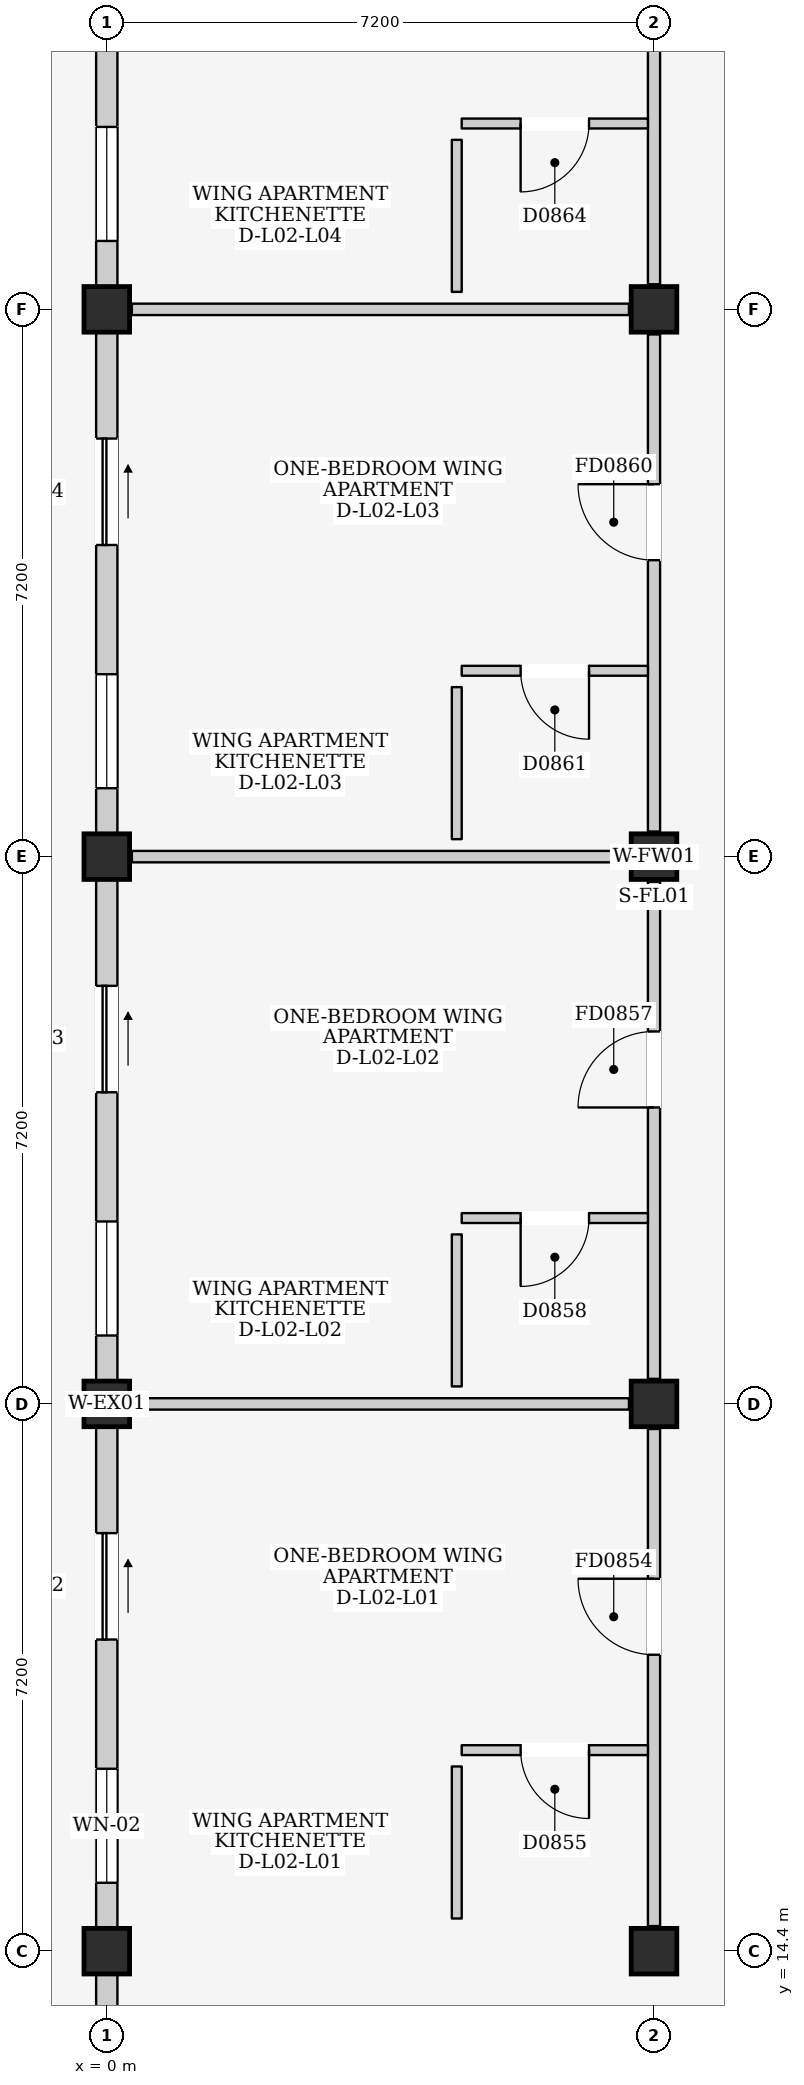
"""IFC4 building model, lengths in metres.
Left out: names, types, materials, properties, quantities, classifications, styles, units other than length and angle.
Written with IfcOpenShell. Run it as: python <this file> out.ifc"""

import sys

from ifc_helpers import new_model, si_unit, direction, frame, frame_2d, origin, origin_2d, place, context, subcontext, project, spatial, rectangle, extrude, element, fill, save


model = new_model("IFC4")
c1 = context("Model", 3, precision=1e-05, world=origin(), true_north=direction((0.0, 1.0)))
c2 = subcontext(c1, "Body", "Model", "MODEL_VIEW")
j1 = project(units=[si_unit("LENGTHUNIT", "METRE"), si_unit("PLANEANGLEUNIT", "RADIAN")], contexts=[c1])
p1 = place(None, origin())
s1 = spatial("IfcSite", under=j1, at=p1, CompositionType="ELEMENT")
p2 = place(p1, origin())
s2 = spatial("IfcBuilding", under=s1, at=p2, CompositionType="ELEMENT")
p3 = place(p2, frame((0.0, 0.0, 9.0)))
s3 = spatial("IfcBuildingStorey", under=s2, at=p3, CompositionType="ELEMENT", Elevation=9.0)
for number, where, z_axis, x_axis in (
    (1, (0.0, 14.4, 0.0), (0.0, 0.0, 1.0), (1.0, 0.0, 0.0)),
    (2, (0.0, 21.6, 0.0), (0.0, 0.0, 1.0), (1.0, 0.0, 0.0)),
    (3, (0.0, 28.8, 0.0), (0.0, 0.0, 1.0), (1.0, 0.0, 0.0)),
    (4, (0.0, 36.0, 0.0), (0.0, 0.0, 1.0), (1.0, 0.0, 0.0)),
    (5, (7.2, 14.4, 0.0), (0.0, 0.0, 1.0), (1.0, 0.0, 0.0)),
    (6, (7.2, 21.6, 0.0), (0.0, 0.0, 1.0), (1.0, 0.0, 0.0)),
    (7, (7.2, 28.8, 0.0), (0.0, 0.0, 1.0), (1.0, 0.0, 0.0)),
    (8, (7.2, 36.0, 0.0), (0.0, 0.0, 1.0), (1.0, 0.0, 0.0)),
):
    element("IfcColumn", number, at=place(p3, frame(where, z_axis=z_axis, x_axis=x_axis)), inside=s3, PredefinedType="COLUMN", context=c2, shape_type="SweptSolid", body=[
        extrude(rectangle(XDim=0.6, YDim=0.6, at=origin_2d()), origin(), (0.0, 0.0, 1.0), 3.2),
    ])
p4 = place(p3, frame((0.0, 7.5, 0.0), z_axis=(0.0, 0.0, 1.0), x_axis=(0.0, 1.0, 0.0)))
e9 = element("IfcWall", 9, at=p4, inside=s3, PredefinedType="ELEMENTEDWALL", context=c2, shape_type="SweptSolid", body=[
    extrude(rectangle(XDim=6.6, YDim=0.28, at=frame_2d((3.3, 0.0))), origin(), (0.0, 0.0, 1.0), 2.425),
])
p5 = place(p4, frame((3.65, 0.0, 0.0)))
e10 = element("IfcOpeningElement", 10, at=p5, cuts=e9, PredefinedType="OPENING", context=c2, shape_type="SweptSolid", body=[
    extrude(rectangle(XDim=1.4, YDim=2.1, at=frame_2d((0.7, 1.05))), frame((0.0, 0.155, 0.0), z_axis=(0.0, -1.0, 0.0), x_axis=(1.0, 0.0, 0.0)), (0.0, 0.0, 1.0), 0.31),
])
p6 = place(p3, frame((0.0, 14.7, 0.0), z_axis=(0.0, 0.0, 1.0), x_axis=(0.0, 1.0, 0.0)))
e11 = element("IfcWall", 11, at=p6, inside=s3, PredefinedType="ELEMENTEDWALL", context=c2, shape_type="SweptSolid", body=[
    extrude(rectangle(XDim=6.6, YDim=0.28, at=frame_2d((3.3, 0.0))), origin(), (0.0, 0.0, 1.0), 2.425),
])
p7 = place(p6, frame((3.8, 0.0, 0.0)))
e12 = element("IfcOpeningElement", 12, at=p7, cuts=e11, PredefinedType="OPENING", context=c2, shape_type="SweptSolid", body=[
    extrude(rectangle(XDim=1.4, YDim=2.1, at=frame_2d((0.7, 1.05))), frame((0.0, 0.155, 0.0), z_axis=(0.0, -1.0, 0.0), x_axis=(1.0, 0.0, 0.0)), (0.0, 0.0, 1.0), 0.31),
])
p8 = place(p6, frame((0.6, 0.0, 0.815)))
e13 = element("IfcOpeningElement", 13, at=p8, cuts=e11, PredefinedType="OPENING", context=c2, shape_type="SweptSolid", body=[
    extrude(rectangle(XDim=1.5, YDim=1.5, at=frame_2d((0.75, 0.75))), frame((0.0, 0.155, 0.0), z_axis=(0.0, -1.0, 0.0), x_axis=(1.0, 0.0, 0.0)), (0.0, 0.0, 1.0), 0.31),
])
p9 = place(p3, frame((0.0, 21.9, 0.0), z_axis=(0.0, 0.0, 1.0), x_axis=(0.0, 1.0, 0.0)))
e14 = element("IfcWall", 14, at=p9, inside=s3, PredefinedType="ELEMENTEDWALL", context=c2, shape_type="SweptSolid", body=[
    extrude(rectangle(XDim=6.6, YDim=0.28, at=frame_2d((3.3, 0.0))), origin(), (0.0, 0.0, 1.0), 2.425),
])
p10 = place(p9, frame((3.8, 0.0, 0.0)))
e15 = element("IfcOpeningElement", 15, at=p10, cuts=e14, PredefinedType="OPENING", context=c2, shape_type="SweptSolid", body=[
    extrude(rectangle(XDim=1.4, YDim=2.1, at=frame_2d((0.7, 1.05))), frame((0.0, 0.155, 0.0), z_axis=(0.0, -1.0, 0.0), x_axis=(1.0, 0.0, 0.0)), (0.0, 0.0, 1.0), 0.31),
])
p11 = place(p9, frame((0.6, 0.0, 0.815)))
e16 = element("IfcOpeningElement", 16, at=p11, cuts=e14, PredefinedType="OPENING", context=c2, shape_type="SweptSolid", body=[
    extrude(rectangle(XDim=1.5, YDim=1.5, at=frame_2d((0.75, 0.75))), frame((0.0, 0.155, 0.0), z_axis=(0.0, -1.0, 0.0), x_axis=(1.0, 0.0, 0.0)), (0.0, 0.0, 1.0), 0.31),
])
p12 = place(p3, frame((0.0, 29.1, 0.0), z_axis=(0.0, 0.0, 1.0), x_axis=(0.0, 1.0, 0.0)))
e17 = element("IfcWall", 17, at=p12, inside=s3, PredefinedType="ELEMENTEDWALL", context=c2, shape_type="SweptSolid", body=[
    extrude(rectangle(XDim=6.6, YDim=0.28, at=frame_2d((3.3, 0.0))), origin(), (0.0, 0.0, 1.0), 2.425),
])
p13 = place(p12, frame((3.8, 0.0, 0.0)))
e18 = element("IfcOpeningElement", 18, at=p13, cuts=e17, PredefinedType="OPENING", context=c2, shape_type="SweptSolid", body=[
    extrude(rectangle(XDim=1.4, YDim=2.1, at=frame_2d((0.7, 1.05))), frame((0.0, 0.155, 0.0), z_axis=(0.0, -1.0, 0.0), x_axis=(1.0, 0.0, 0.0)), (0.0, 0.0, 1.0), 0.31),
])
p14 = place(p12, frame((0.6, 0.0, 0.815)))
e19 = element("IfcOpeningElement", 19, at=p14, cuts=e17, PredefinedType="OPENING", context=c2, shape_type="SweptSolid", body=[
    extrude(rectangle(XDim=1.5, YDim=1.5, at=frame_2d((0.75, 0.75))), frame((0.0, 0.155, 0.0), z_axis=(0.0, -1.0, 0.0), x_axis=(1.0, 0.0, 0.0)), (0.0, 0.0, 1.0), 0.31),
])
p15 = place(p3, frame((0.0, 36.3, 0.0), z_axis=(0.0, 0.0, 1.0), x_axis=(0.0, 1.0, 0.0)))
e20 = element("IfcWall", 20, at=p15, inside=s3, PredefinedType="ELEMENTEDWALL", context=c2, shape_type="SweptSolid", body=[
    extrude(rectangle(XDim=6.6, YDim=0.28, at=frame_2d((3.3, 0.0))), origin(), (0.0, 0.0, 1.0), 2.425),
])
p16 = place(p15, frame((3.8, 0.0, 0.0)))
e21 = element("IfcOpeningElement", 21, at=p16, cuts=e20, PredefinedType="OPENING", context=c2, shape_type="SweptSolid", body=[
    extrude(rectangle(XDim=1.4, YDim=2.1, at=frame_2d((0.7, 1.05))), frame((0.0, 0.155, 0.0), z_axis=(0.0, -1.0, 0.0), x_axis=(1.0, 0.0, 0.0)), (0.0, 0.0, 1.0), 0.31),
])
p17 = place(p15, frame((0.6, 0.0, 0.815)))
e22 = element("IfcOpeningElement", 22, at=p17, cuts=e20, PredefinedType="OPENING", context=c2, shape_type="SweptSolid", body=[
    extrude(rectangle(XDim=1.5, YDim=1.5, at=frame_2d((0.75, 0.75))), frame((0.0, 0.155, 0.0), z_axis=(0.0, -1.0, 0.0), x_axis=(1.0, 0.0, 0.0)), (0.0, 0.0, 1.0), 0.31),
])
p18 = place(p3, frame((7.2, 14.73, 0.0), z_axis=(0.0, 0.0, 1.0), x_axis=(0.0, 1.0, 0.0)))
e23 = element("IfcWall", 23, at=p18, inside=s3, PredefinedType="PARTITIONING", context=c2, shape_type="SweptSolid", body=[
    extrude(rectangle(XDim=6.54, YDim=0.16, at=frame_2d((3.27, 0.0))), origin(), (0.0, 0.0, 1.0), 2.395),
])
p19 = place(p18, frame((3.57, 0.0, 0.0)))
e24 = element("IfcOpeningElement", 24, at=p19, cuts=e23, PredefinedType="OPENING", context=c2, shape_type="SweptSolid", body=[
    extrude(rectangle(XDim=1.0, YDim=2.15, at=frame_2d((0.5, 1.075))), frame((0.0, 0.095, 0.0), z_axis=(0.0, -1.0, 0.0), x_axis=(1.0, 0.0, 0.0)), (0.0, 0.0, 1.0), 0.19),
])
p20 = place(p3, frame((0.33, 21.6, 0.0), z_axis=(0.0, 0.0, 1.0), x_axis=(1.0, 0.0, 0.0)))
e25 = element("IfcWall", 25, at=p20, inside=s3, PredefinedType="PARTITIONING", context=c2, shape_type="SweptSolid", body=[
    extrude(rectangle(XDim=6.54, YDim=0.15, at=frame_2d((3.27, 0.0))), origin(), (0.0, 0.0, 1.0), 2.345),
])
p21 = place(p3, frame((4.67, 17.045, 0.0), z_axis=(0.0, 0.0, 1.0), x_axis=(1.0, 0.0, 0.0)))
e26 = element("IfcWall", 26, at=p21, inside=s3, PredefinedType="PARTITIONING", context=c2, shape_type="SweptSolid", body=[
    extrude(rectangle(XDim=2.45, YDim=0.13, at=frame_2d((1.225, 0.0))), origin(), (0.0, 0.0, 1.0), 2.96),
])
p22 = place(p21, frame((0.775, 0.0, 0.0)))
e27 = element("IfcOpeningElement", 27, at=p22, cuts=e26, PredefinedType="OPENING", context=c2, shape_type="SweptSolid", body=[
    extrude(rectangle(XDim=0.9, YDim=2.1, at=frame_2d((0.45, 1.05))), frame((0.0, 0.08, 0.0), z_axis=(0.0, -1.0, 0.0), x_axis=(1.0, 0.0, 0.0)), (0.0, 0.0, 1.0), 0.16),
])
p23 = place(p3, frame((4.605, 14.83, 0.0), z_axis=(0.0, 0.0, 1.0), x_axis=(0.0, 1.0, 0.0)))
e28 = element("IfcWall", 28, at=p23, inside=s3, PredefinedType="PARTITIONING", context=c2, shape_type="SweptSolid", body=[
    extrude(rectangle(XDim=2.0, YDim=0.13, at=frame_2d((1.0, 0.0))), origin(), (0.0, 0.0, 1.0), 2.96),
])
p24 = place(p3, frame((7.2, 21.93, 0.0), z_axis=(0.0, 0.0, 1.0), x_axis=(0.0, 1.0, 0.0)))
e29 = element("IfcWall", 29, at=p24, inside=s3, PredefinedType="PARTITIONING", context=c2, shape_type="SweptSolid", body=[
    extrude(rectangle(XDim=6.54, YDim=0.16, at=frame_2d((3.27, 0.0))), origin(), (0.0, 0.0, 1.0), 2.395),
])
p25 = place(p24, frame((3.57, 0.0, 0.0)))
e30 = element("IfcOpeningElement", 30, at=p25, cuts=e29, PredefinedType="OPENING", context=c2, shape_type="SweptSolid", body=[
    extrude(rectangle(XDim=1.0, YDim=2.15, at=frame_2d((0.5, 1.075))), frame((0.0, 0.095, 0.0), z_axis=(0.0, -1.0, 0.0), x_axis=(1.0, 0.0, 0.0)), (0.0, 0.0, 1.0), 0.19),
])
p26 = place(p3, frame((0.33, 28.8, 0.0), z_axis=(0.0, 0.0, 1.0), x_axis=(1.0, 0.0, 0.0)))
e31 = element("IfcWall", 31, at=p26, inside=s3, PredefinedType="PARTITIONING", context=c2, shape_type="SweptSolid", body=[
    extrude(rectangle(XDim=6.54, YDim=0.15, at=frame_2d((3.27, 0.0))), origin(), (0.0, 0.0, 1.0), 2.345),
])
p27 = place(p3, frame((4.67, 24.045, 0.0), z_axis=(0.0, 0.0, 1.0), x_axis=(1.0, 0.0, 0.0)))
e32 = element("IfcWall", 32, at=p27, inside=s3, PredefinedType="PARTITIONING", context=c2, shape_type="SweptSolid", body=[
    extrude(rectangle(XDim=2.45, YDim=0.13, at=frame_2d((1.225, 0.0))), origin(), (0.0, 0.0, 1.0), 2.96),
])
p28 = place(p27, frame((0.775, 0.0, 0.0)))
e33 = element("IfcOpeningElement", 33, at=p28, cuts=e32, PredefinedType="OPENING", context=c2, shape_type="SweptSolid", body=[
    extrude(rectangle(XDim=0.9, YDim=2.1, at=frame_2d((0.45, 1.05))), frame((0.0, 0.08, 0.0), z_axis=(0.0, -1.0, 0.0), x_axis=(1.0, 0.0, 0.0)), (0.0, 0.0, 1.0), 0.16),
])
p29 = place(p3, frame((4.605, 21.83, 0.0), z_axis=(0.0, 0.0, 1.0), x_axis=(0.0, 1.0, 0.0)))
e34 = element("IfcWall", 34, at=p29, inside=s3, PredefinedType="PARTITIONING", context=c2, shape_type="SweptSolid", body=[
    extrude(rectangle(XDim=2.0, YDim=0.13, at=frame_2d((1.0, 0.0))), origin(), (0.0, 0.0, 1.0), 2.96),
])
p30 = place(p3, frame((7.2, 29.13, 0.0), z_axis=(0.0, 0.0, 1.0), x_axis=(0.0, 1.0, 0.0)))
e35 = element("IfcWall", 35, at=p30, inside=s3, PredefinedType="PARTITIONING", context=c2, shape_type="SweptSolid", body=[
    extrude(rectangle(XDim=6.54, YDim=0.16, at=frame_2d((3.27, 0.0))), origin(), (0.0, 0.0, 1.0), 2.395),
])
p31 = place(p30, frame((3.57, 0.0, 0.0)))
e36 = element("IfcOpeningElement", 36, at=p31, cuts=e35, PredefinedType="OPENING", context=c2, shape_type="SweptSolid", body=[
    extrude(rectangle(XDim=1.0, YDim=2.15, at=frame_2d((0.5, 1.075))), frame((0.0, 0.095, 0.0), z_axis=(0.0, -1.0, 0.0), x_axis=(1.0, 0.0, 0.0)), (0.0, 0.0, 1.0), 0.19),
])
p32 = place(p3, frame((0.33, 36.0, 0.0), z_axis=(0.0, 0.0, 1.0), x_axis=(1.0, 0.0, 0.0)))
e37 = element("IfcWall", 37, at=p32, inside=s3, PredefinedType="PARTITIONING", context=c2, shape_type="SweptSolid", body=[
    extrude(rectangle(XDim=6.54, YDim=0.15, at=frame_2d((3.27, 0.0))), origin(), (0.0, 0.0, 1.0), 2.345),
])
p33 = place(p3, frame((4.67, 31.245, 0.0), z_axis=(0.0, 0.0, 1.0), x_axis=(1.0, 0.0, 0.0)))
e38 = element("IfcWall", 38, at=p33, inside=s3, PredefinedType="PARTITIONING", context=c2, shape_type="SweptSolid", body=[
    extrude(rectangle(XDim=2.45, YDim=0.13, at=frame_2d((1.225, 0.0))), origin(), (0.0, 0.0, 1.0), 2.96),
])
p34 = place(p33, frame((0.775, 0.0, 0.0)))
e39 = element("IfcOpeningElement", 39, at=p34, cuts=e38, PredefinedType="OPENING", context=c2, shape_type="SweptSolid", body=[
    extrude(rectangle(XDim=0.9, YDim=2.1, at=frame_2d((0.45, 1.05))), frame((0.0, 0.08, 0.0), z_axis=(0.0, -1.0, 0.0), x_axis=(1.0, 0.0, 0.0)), (0.0, 0.0, 1.0), 0.16),
])
p35 = place(p3, frame((4.605, 29.03, 0.0), z_axis=(0.0, 0.0, 1.0), x_axis=(0.0, 1.0, 0.0)))
e40 = element("IfcWall", 40, at=p35, inside=s3, PredefinedType="PARTITIONING", context=c2, shape_type="SweptSolid", body=[
    extrude(rectangle(XDim=2.0, YDim=0.13, at=frame_2d((1.0, 0.0))), origin(), (0.0, 0.0, 1.0), 2.96),
])
p36 = place(p3, frame((7.2, 36.33, 0.0), z_axis=(0.0, 0.0, 1.0), x_axis=(0.0, 1.0, 0.0)))
e41 = element("IfcWall", 41, at=p36, inside=s3, PredefinedType="PARTITIONING", context=c2, shape_type="SweptSolid", body=[
    extrude(rectangle(XDim=6.54, YDim=0.16, at=frame_2d((3.27, 0.0))), origin(), (0.0, 0.0, 1.0), 2.395),
])
p37 = place(p36, frame((3.57, 0.0, 0.0)))
e42 = element("IfcOpeningElement", 42, at=p37, cuts=e41, PredefinedType="OPENING", context=c2, shape_type="SweptSolid", body=[
    extrude(rectangle(XDim=1.0, YDim=2.15, at=frame_2d((0.5, 1.075))), frame((0.0, 0.095, 0.0), z_axis=(0.0, -1.0, 0.0), x_axis=(1.0, 0.0, 0.0)), (0.0, 0.0, 1.0), 0.19),
])
p38 = place(p3, frame((4.67, 38.445, 0.0), z_axis=(0.0, 0.0, 1.0), x_axis=(1.0, 0.0, 0.0)))
e43 = element("IfcWall", 43, at=p38, inside=s3, PredefinedType="PARTITIONING", context=c2, shape_type="SweptSolid", body=[
    extrude(rectangle(XDim=2.45, YDim=0.13, at=frame_2d((1.225, 0.0))), origin(), (0.0, 0.0, 1.0), 2.96),
])
p39 = place(p38, frame((0.775, 0.0, 0.0)))
e44 = element("IfcOpeningElement", 44, at=p39, cuts=e43, PredefinedType="OPENING", context=c2, shape_type="SweptSolid", body=[
    extrude(rectangle(XDim=0.9, YDim=2.1, at=frame_2d((0.45, 1.05))), frame((0.0, 0.08, 0.0), z_axis=(0.0, -1.0, 0.0), x_axis=(1.0, 0.0, 0.0)), (0.0, 0.0, 1.0), 0.16),
])
p40 = place(p3, frame((4.605, 36.23, 0.0), z_axis=(0.0, 0.0, 1.0), x_axis=(0.0, 1.0, 0.0)))
e45 = element("IfcWall", 45, at=p40, inside=s3, PredefinedType="PARTITIONING", context=c2, shape_type="SweptSolid", body=[
    extrude(rectangle(XDim=2.0, YDim=0.13, at=frame_2d((1.0, 0.0))), origin(), (0.0, 0.0, 1.0), 2.96),
])
p41 = place(p7, frame((1.4, 0.0, 0.0), z_axis=(0.0, 0.0, 1.0), x_axis=(-1.0, 0.0, 0.0)))
e46 = element("IfcDoor", 46, at=p41, inside=s3, OperationType="SLIDING_TO_RIGHT", PredefinedType="DOOR", context=c2, shape_type="SweptSolid", body=[
    extrude(rectangle(XDim=1.4, YDim=2.1, at=frame_2d((0.7, 1.05))), frame((0.0, 0.025, 0.0), z_axis=(0.0, -1.0, 0.0), x_axis=(1.0, 0.0, 0.0)), (0.0, 0.0, 1.0), 0.05),
])
fill(e12, e46)
p42 = place(p8, origin())
e47 = element("IfcWindow", 47, at=p42, inside=s3, PartitioningType="DOUBLE_PANEL_VERTICAL", PredefinedType="WINDOW", context=c2, shape_type="SweptSolid", body=[
    extrude(rectangle(XDim=1.5, YDim=1.5, at=frame_2d((0.75, 0.75))), frame((0.0, 0.03, 0.0), z_axis=(0.0, -1.0, 0.0), x_axis=(1.0, 0.0, 0.0)), (0.0, 0.0, 1.0), 0.06),
])
fill(e13, e47)
p43 = place(p10, frame((1.4, 0.0, 0.0), z_axis=(0.0, 0.0, 1.0), x_axis=(-1.0, 0.0, 0.0)))
e48 = element("IfcDoor", 48, at=p43, inside=s3, OperationType="SLIDING_TO_RIGHT", PredefinedType="DOOR", context=c2, shape_type="SweptSolid", body=[
    extrude(rectangle(XDim=1.4, YDim=2.1, at=frame_2d((0.7, 1.05))), frame((0.0, 0.025, 0.0), z_axis=(0.0, -1.0, 0.0), x_axis=(1.0, 0.0, 0.0)), (0.0, 0.0, 1.0), 0.05),
])
fill(e15, e48)
p44 = place(p11, origin())
e49 = element("IfcWindow", 49, at=p44, inside=s3, PartitioningType="DOUBLE_PANEL_VERTICAL", PredefinedType="WINDOW", context=c2, shape_type="SweptSolid", body=[
    extrude(rectangle(XDim=1.5, YDim=1.5, at=frame_2d((0.75, 0.75))), frame((0.0, 0.03, 0.0), z_axis=(0.0, -1.0, 0.0), x_axis=(1.0, 0.0, 0.0)), (0.0, 0.0, 1.0), 0.06),
])
fill(e16, e49)
p45 = place(p13, frame((1.4, 0.0, 0.0), z_axis=(0.0, 0.0, 1.0), x_axis=(-1.0, 0.0, 0.0)))
e50 = element("IfcDoor", 50, at=p45, inside=s3, OperationType="SLIDING_TO_RIGHT", PredefinedType="DOOR", context=c2, shape_type="SweptSolid", body=[
    extrude(rectangle(XDim=1.4, YDim=2.1, at=frame_2d((0.7, 1.05))), frame((0.0, 0.025, 0.0), z_axis=(0.0, -1.0, 0.0), x_axis=(1.0, 0.0, 0.0)), (0.0, 0.0, 1.0), 0.05),
])
fill(e18, e50)
p46 = place(p14, origin())
e51 = element("IfcWindow", 51, at=p46, inside=s3, PartitioningType="DOUBLE_PANEL_VERTICAL", PredefinedType="WINDOW", context=c2, shape_type="SweptSolid", body=[
    extrude(rectangle(XDim=1.5, YDim=1.5, at=frame_2d((0.75, 0.75))), frame((0.0, 0.03, 0.0), z_axis=(0.0, -1.0, 0.0), x_axis=(1.0, 0.0, 0.0)), (0.0, 0.0, 1.0), 0.06),
])
fill(e19, e51)
p47 = place(p17, origin())
e52 = element("IfcWindow", 52, at=p47, inside=s3, PartitioningType="DOUBLE_PANEL_VERTICAL", PredefinedType="WINDOW", context=c2, shape_type="SweptSolid", body=[
    extrude(rectangle(XDim=1.5, YDim=1.5, at=frame_2d((0.75, 0.75))), frame((0.0, 0.03, 0.0), z_axis=(0.0, -1.0, 0.0), x_axis=(1.0, 0.0, 0.0)), (0.0, 0.0, 1.0), 0.06),
])
fill(e22, e52)
p48 = place(p19, origin())
e53 = element("IfcDoor", 53, at=p48, inside=s3, OperationType="SINGLE_SWING_RIGHT", PredefinedType="DOOR", context=c2, shape_type="SweptSolid", body=[
    extrude(rectangle(XDim=1.0, YDim=2.15, at=frame_2d((0.5, 1.075))), frame((0.0, 0.025, 0.0), z_axis=(0.0, -1.0, 0.0), x_axis=(1.0, 0.0, 0.0)), (0.0, 0.0, 1.0), 0.05),
])
fill(e24, e53)
p49 = place(p22, frame((0.9, 0.0, 0.0), z_axis=(0.0, 0.0, 1.0), x_axis=(-1.0, 0.0, 0.0)))
e54 = element("IfcDoor", 54, at=p49, inside=s3, OperationType="SINGLE_SWING_LEFT", PredefinedType="DOOR", context=c2, shape_type="SweptSolid", body=[
    extrude(rectangle(XDim=0.9, YDim=2.1, at=frame_2d((0.45, 1.05))), frame((0.0, 0.025, 0.0), z_axis=(0.0, -1.0, 0.0), x_axis=(1.0, 0.0, 0.0)), (0.0, 0.0, 1.0), 0.05),
])
fill(e27, e54)
p50 = place(p25, origin())
e55 = element("IfcDoor", 55, at=p50, inside=s3, OperationType="SINGLE_SWING_LEFT", PredefinedType="DOOR", context=c2, shape_type="SweptSolid", body=[
    extrude(rectangle(XDim=1.0, YDim=2.15, at=frame_2d((0.5, 1.075))), frame((0.0, 0.025, 0.0), z_axis=(0.0, -1.0, 0.0), x_axis=(1.0, 0.0, 0.0)), (0.0, 0.0, 1.0), 0.05),
])
fill(e30, e55)
p51 = place(p28, frame((0.9, 0.0, 0.0), z_axis=(0.0, 0.0, 1.0), x_axis=(-1.0, 0.0, 0.0)))
e56 = element("IfcDoor", 56, at=p51, inside=s3, OperationType="SINGLE_SWING_RIGHT", PredefinedType="DOOR", context=c2, shape_type="SweptSolid", body=[
    extrude(rectangle(XDim=0.9, YDim=2.1, at=frame_2d((0.45, 1.05))), frame((0.0, 0.025, 0.0), z_axis=(0.0, -1.0, 0.0), x_axis=(1.0, 0.0, 0.0)), (0.0, 0.0, 1.0), 0.05),
])
fill(e33, e56)
p52 = place(p31, origin())
e57 = element("IfcDoor", 57, at=p52, inside=s3, OperationType="SINGLE_SWING_RIGHT", PredefinedType="DOOR", context=c2, shape_type="SweptSolid", body=[
    extrude(rectangle(XDim=1.0, YDim=2.15, at=frame_2d((0.5, 1.075))), frame((0.0, 0.025, 0.0), z_axis=(0.0, -1.0, 0.0), x_axis=(1.0, 0.0, 0.0)), (0.0, 0.0, 1.0), 0.05),
])
fill(e36, e57)
p53 = place(p34, frame((0.9, 0.0, 0.0), z_axis=(0.0, 0.0, 1.0), x_axis=(-1.0, 0.0, 0.0)))
e58 = element("IfcDoor", 58, at=p53, inside=s3, OperationType="SINGLE_SWING_LEFT", PredefinedType="DOOR", context=c2, shape_type="SweptSolid", body=[
    extrude(rectangle(XDim=0.9, YDim=2.1, at=frame_2d((0.45, 1.05))), frame((0.0, 0.025, 0.0), z_axis=(0.0, -1.0, 0.0), x_axis=(1.0, 0.0, 0.0)), (0.0, 0.0, 1.0), 0.05),
])
fill(e39, e58)
p54 = place(p39, frame((0.9, 0.0, 0.0), z_axis=(0.0, 0.0, 1.0), x_axis=(-1.0, 0.0, 0.0)))
e59 = element("IfcDoor", 59, at=p54, inside=s3, OperationType="SINGLE_SWING_RIGHT", PredefinedType="DOOR", context=c2, shape_type="SweptSolid", body=[
    extrude(rectangle(XDim=0.9, YDim=2.1, at=frame_2d((0.45, 1.05))), frame((0.0, 0.025, 0.0), z_axis=(0.0, -1.0, 0.0), x_axis=(1.0, 0.0, 0.0)), (0.0, 0.0, 1.0), 0.05),
])
fill(e44, e59)
save(model, sys.argv[1])
